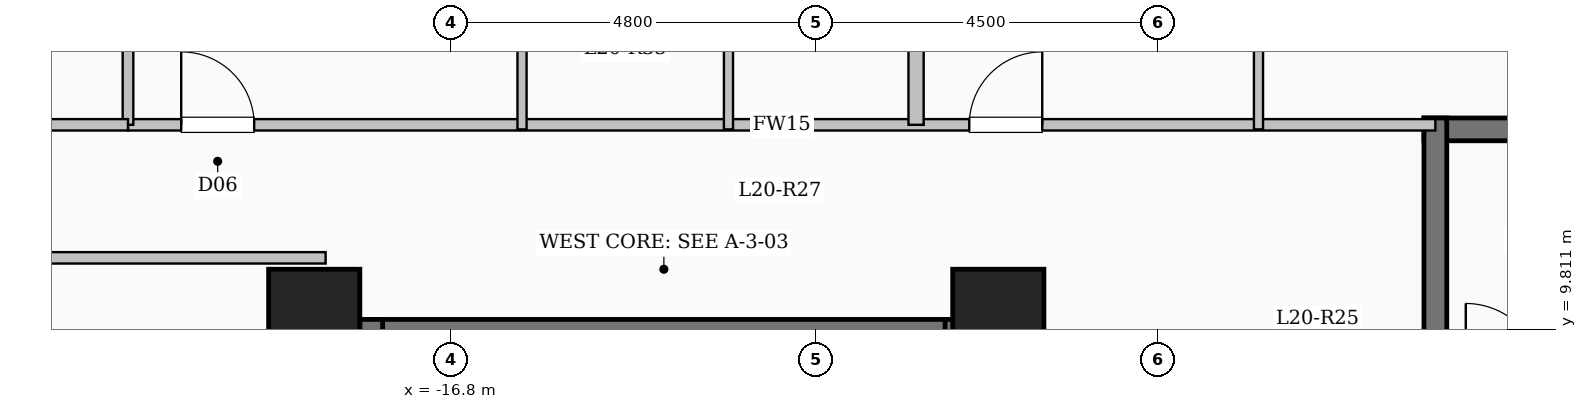
"""IFC4 building model, lengths in metres.
Left out: names, types, materials, properties, quantities, classifications, styles, units other than length and angle.
Written with IfcOpenShell. Run it as: python <this file> out.ifc"""

import sys

from ifc_helpers import new_model, si_unit, direction, frame, frame_2d, origin, origin_2d, place, context, subcontext, project, spatial, rectangle, extrude, element, fill, save


model = new_model("IFC4")
c1 = context("Model", 3, precision=1e-05, world=origin(), true_north=direction((0.0, 1.0)))
c2 = subcontext(c1, "Body", "Model", "MODEL_VIEW")
j1 = project(units=[si_unit("LENGTHUNIT", "METRE"), si_unit("PLANEANGLEUNIT", "RADIAN")], contexts=[c1])
p1 = place(None, origin())
s1 = spatial("IfcSite", under=j1, at=p1, CompositionType="ELEMENT")
p2 = place(p1, origin())
s2 = spatial("IfcBuilding", under=s1, at=p2, CompositionType="ELEMENT")
p3 = place(p2, frame((0.0, 0.0, 78.3)))
s3 = spatial("IfcBuildingStorey", under=s2, at=p3, CompositionType="ELEMENT", Elevation=78.3)
for number, where, z_axis, x_axis in (
    (1, (-9.6, 10.0, 0.0), (0.0, 0.0, 1.0), (1.0, 0.0, 0.0)),
    (2, (-18.6, 10.0, 0.0), (0.0, 0.0, 1.0), (1.0, 0.0, 0.0)),
):
    element("IfcColumn", number, at=place(p3, frame(where, z_axis=z_axis, x_axis=x_axis)), inside=s3, PredefinedType="COLUMN", context=c2, shape_type="SweptSolid", body=[
        extrude(rectangle(XDim=1.2, YDim=1.2, at=origin_2d()), origin(), (0.0, 0.0, 1.0), 3.35),
    ])
p4 = place(p3, frame((-18.0, 9.79, 0.0), z_axis=(0.0, 0.0, 1.0), x_axis=(1.0, 0.0, 0.0)))
e3 = element("IfcWall", 3, at=p4, inside=s3, PredefinedType="SHEAR", context=c2, shape_type="SweptSolid", body=[
    extrude(rectangle(XDim=8.0, YDim=0.3, at=frame_2d((4.0, 0.0))), origin(), (0.0, 0.0, 1.0), 3.35),
])
for number, where, z_axis, x_axis in (
    (4, (-17.85, 6.35, 0.0), (0.0, 0.0, 1.0), (0.0, 1.0, 0.0)),
    (5, (-10.15, 6.35, 0.0), (0.0, 0.0, 1.0), (0.0, 1.0, 0.0)),
):
    element("IfcWall", number, at=place(p3, frame(where, z_axis=z_axis, x_axis=x_axis)), inside=s3, PredefinedType="SHEAR", context=c2, shape_type="SweptSolid", body=[
        extrude(rectangle(XDim=3.59, YDim=0.3, at=frame_2d((1.795, 0.0))), origin(), (0.0, 0.0, 1.0), 3.35),
    ])
p5 = place(p3, frame((-4.0, 12.44, 0.0), z_axis=(0.0, 0.0, 1.0), x_axis=(1.0, 0.0, 0.0)))
e6 = element("IfcWall", 6, at=p5, inside=s3, PredefinedType="SHEAR", context=c2, shape_type="SweptSolid", body=[
    extrude(rectangle(XDim=8.0, YDim=0.3, at=frame_2d((4.0, 0.0))), origin(), (0.0, 0.0, 1.0), 3.35),
])
p6 = place(p3, frame((-3.85, 9.0, 0.0), z_axis=(0.0, 0.0, 1.0), x_axis=(0.0, 1.0, 0.0)))
e7 = element("IfcWall", 7, at=p6, inside=s3, PredefinedType="SHEAR", context=c2, shape_type="SweptSolid", body=[
    extrude(rectangle(XDim=3.59, YDim=0.3, at=frame_2d((1.795, 0.0))), origin(), (0.0, 0.0, 1.0), 3.35),
])
p7 = place(p3, frame((-21.05, 12.5, 0.0), z_axis=(0.0, 0.0, 1.0), x_axis=(1.0, 0.0, 0.0)))
e8 = element("IfcWall", 8, at=p7, inside=s3, PredefinedType="PARTITIONING", context=c2, shape_type="SweptSolid", body=[
    extrude(rectangle(XDim=17.2, YDim=0.15, at=frame_2d((8.6, 0.0))), origin(), (0.0, 0.0, 1.0), 3.1),
])
p8 = place(p7, frame((0.7, 0.0, 0.0)))
e9 = element("IfcOpeningElement", 9, at=p8, cuts=e8, PredefinedType="OPENING", context=c2, shape_type="SweptSolid", body=[
    extrude(rectangle(XDim=0.96, YDim=2.15, at=frame_2d((0.48, 1.075))), frame((0.0, 0.085, 0.0), z_axis=(0.0, -1.0, 0.0), x_axis=(1.0, 0.0, 0.0)), (0.0, 0.0, 1.0), 0.17),
])
p9 = place(p7, frame((11.068, 0.0, 0.0)))
e10 = element("IfcOpeningElement", 10, at=p9, cuts=e8, PredefinedType="OPENING", context=c2, shape_type="SweptSolid", body=[
    extrude(rectangle(XDim=0.96, YDim=2.15, at=frame_2d((0.48, 1.075))), frame((0.0, 0.085, 0.0), z_axis=(0.0, -1.0, 0.0), x_axis=(1.0, 0.0, 0.0)), (0.0, 0.0, 1.0), 0.17),
])
p10 = place(p3, frame((-10.682, 12.5, 0.0), z_axis=(0.0, 0.0, 1.0), x_axis=(0.0, 1.0, 0.0)))
e11 = element("IfcWall", 11, at=p10, inside=s3, PredefinedType="SOLIDWALL", context=c2, shape_type="SweptSolid", body=[
    extrude(rectangle(XDim=9.678, YDim=0.2, at=frame_2d((4.839, 0.0))), origin(), (0.0, 0.0, 1.0), 3.1),
])
p11 = place(p3, frame((-15.866, 12.44, 0.0), z_axis=(0.0, 0.0, 1.0), x_axis=(0.0, 1.0, 0.0)))
e12 = element("IfcWall", 12, at=p11, inside=s3, PredefinedType="PARTITIONING", context=c2, shape_type="SweptSolid", body=[
    extrude(rectangle(XDim=9.66, YDim=0.12, at=frame_2d((4.83, 0.0))), origin(), (0.0, 0.0, 1.0), 3.1),
])
p12 = place(p11, frame((2.905, 0.0, 0.0)))
e13 = element("IfcOpeningElement", 13, at=p12, cuts=e12, PredefinedType="OPENING", context=c2, shape_type="SweptSolid", body=[
    extrude(rectangle(XDim=1.08, YDim=2.15, at=frame_2d((0.54, 1.075))), frame((0.0, 0.07, 0.0), z_axis=(0.0, -1.0, 0.0), x_axis=(1.0, 0.0, 0.0)), (0.0, 0.0, 1.0), 0.14),
])
p13 = place(p3, frame((-13.15, 12.44, 0.0), z_axis=(0.0, 0.0, 1.0), x_axis=(0.0, 1.0, 0.0)))
e14 = element("IfcWall", 14, at=p13, inside=s3, PredefinedType="PARTITIONING", context=c2, shape_type="SweptSolid", body=[
    extrude(rectangle(XDim=2.62, YDim=0.12, at=frame_2d((1.31, 0.0))), origin(), (0.0, 0.0, 1.0), 3.1),
])
p14 = place(p3, frame((-6.177, 12.44, 0.0), z_axis=(0.0, 0.0, 1.0), x_axis=(0.0, 1.0, 0.0)))
e15 = element("IfcWall", 15, at=p14, inside=s3, PredefinedType="PARTITIONING", context=c2, shape_type="SweptSolid", body=[
    extrude(rectangle(XDim=10.85, YDim=0.12, at=frame_2d((5.425, 0.0))), origin(), (0.0, 0.0, 1.0), 3.1),
])
p15 = place(p14, frame((3.075, 0.0, 0.0)))
e16 = element("IfcOpeningElement", 16, at=p15, cuts=e15, PredefinedType="OPENING", context=c2, shape_type="SweptSolid", body=[
    extrude(rectangle(XDim=1.08, YDim=2.15, at=frame_2d((0.54, 1.075))), frame((0.0, 0.07, 0.0), z_axis=(0.0, -1.0, 0.0), x_axis=(1.0, 0.0, 0.0)), (0.0, 0.0, 1.0), 0.14),
])
p16 = place(p3, frame((-26.88, 10.75, 0.0), z_axis=(0.0, 0.0, 1.0), x_axis=(1.0, 0.0, 0.0)))
e17 = element("IfcWall", 17, at=p16, inside=s3, PredefinedType="PARTITIONING", context=c2, shape_type="SweptSolid", body=[
    extrude(rectangle(XDim=8.43, YDim=0.15, at=frame_2d((4.215, 0.0))), origin(), (0.0, 0.0, 1.0), 3.1),
])
p17 = place(p3, frame((-21.05, 12.5, 0.0), z_axis=(0.0, 0.0, 1.0), x_axis=(0.0, 1.0, 0.0)))
e18 = element("IfcWall", 18, at=p17, inside=s3, PredefinedType="PARTITIONING", context=c2, shape_type="SweptSolid", body=[
    extrude(rectangle(XDim=5.35, YDim=0.14, at=frame_2d((2.675, 0.0))), origin(), (0.0, 0.0, 1.0), 3.1),
])
p18 = place(p3, frame((-26.88, 12.5, 0.0), z_axis=(0.0, 0.0, 1.0), x_axis=(1.0, 0.0, 0.0)))
e19 = element("IfcWall", 19, at=p18, inside=s3, PredefinedType="PARTITIONING", context=c2, shape_type="SweptSolid", body=[
    extrude(rectangle(XDim=5.83, YDim=0.15, at=frame_2d((2.915, 0.0))), origin(), (0.0, 0.0, 1.0), 3.1),
])
p19 = place(p18, frame((2.44, 0.0, 0.0)))
e20 = element("IfcOpeningElement", 20, at=p19, cuts=e19, PredefinedType="OPENING", context=c2, shape_type="SweptSolid", body=[
    extrude(rectangle(XDim=0.95, YDim=2.15, at=frame_2d((0.475, 1.075))), frame((0.0, 0.085, 0.0), z_axis=(0.0, -1.0, 0.0), x_axis=(1.0, 0.0, 0.0)), (0.0, 0.0, 1.0), 0.17),
])
p20 = place(p8, origin())
e21 = element("IfcDoor", 21, at=p20, inside=s3, OperationType="SINGLE_SWING_LEFT", PredefinedType="DOOR", context=c2, shape_type="SweptSolid", body=[
    extrude(rectangle(XDim=0.96, YDim=2.15, at=frame_2d((0.48, 1.075))), frame((0.0, 0.025, 0.0), z_axis=(0.0, -1.0, 0.0), x_axis=(1.0, 0.0, 0.0)), (0.0, 0.0, 1.0), 0.05),
])
fill(e9, e21)
p21 = place(p9, origin())
e22 = element("IfcDoor", 22, at=p21, inside=s3, OperationType="SINGLE_SWING_RIGHT", PredefinedType="DOOR", context=c2, shape_type="SweptSolid", body=[
    extrude(rectangle(XDim=0.96, YDim=2.15, at=frame_2d((0.48, 1.075))), frame((0.0, 0.025, 0.0), z_axis=(0.0, -1.0, 0.0), x_axis=(1.0, 0.0, 0.0)), (0.0, 0.0, 1.0), 0.05),
])
fill(e10, e22)
save(model, sys.argv[1])
